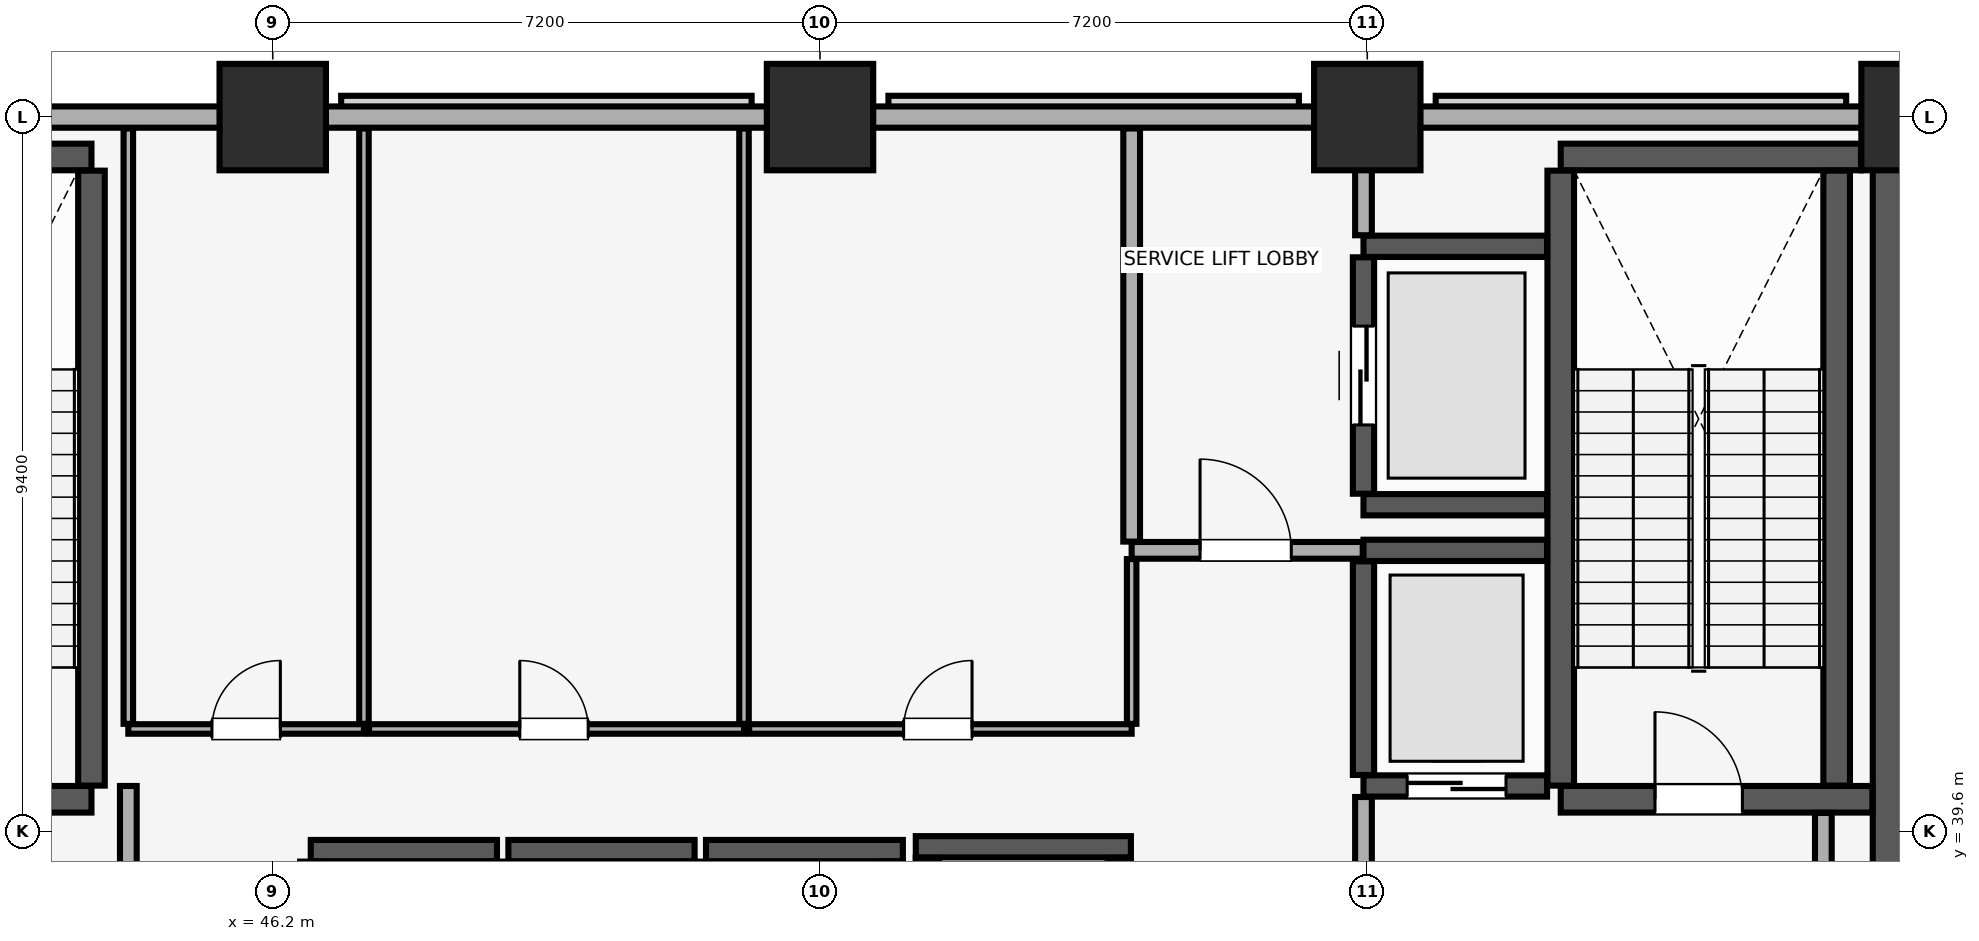
"""IFC4 building model, lengths in metres.
Left out: names, types, materials, properties, quantities, classifications, styles, units other than length and angle.
Written with IfcOpenShell. Run it as: python <this file> out.ifc"""

import sys

from ifc_helpers import new_model, si_unit, direction, frame, frame_2d, origin, origin_2d, place, context, subcontext, project, spatial, rectangle, extrude, element, fill, save


model = new_model("IFC4")
c1 = context("Model", 3, precision=1e-05, world=origin(), true_north=direction((0.0, 1.0)))
c2 = subcontext(c1, "Body", "Model", "MODEL_VIEW")
j1 = project(units=[si_unit("LENGTHUNIT", "METRE"), si_unit("PLANEANGLEUNIT", "RADIAN")], contexts=[c1])
p1 = place(None, origin())
s1 = spatial("IfcSite", under=j1, at=p1, CompositionType="ELEMENT")
p2 = place(p1, origin())
s2 = spatial("IfcBuilding", under=s1, at=p2, CompositionType="ELEMENT")
p3 = place(p2, frame((0.0, 0.0, 80.15)))
s3 = spatial("IfcBuildingStorey", under=s2, at=p3, CompositionType="ELEMENT", Elevation=80.15)
for number, where, z_axis, x_axis in (
    (1, (46.2, 49.0, 0.0), (0.0, 0.0, 1.0), (1.0, 0.0, 0.0)),
    (2, (53.4, 49.0, 0.0), (0.0, 0.0, 1.0), (1.0, 0.0, 0.0)),
    (3, (60.6, 49.0, 0.0), (0.0, 0.0, 1.0), (1.0, 0.0, 0.0)),
    (4, (67.8, 49.0, 0.0), (0.0, 0.0, 1.0), (1.0, 0.0, 0.0)),
):
    element("IfcColumn", number, at=place(p3, frame(where, z_axis=z_axis, x_axis=x_axis)), inside=s3, PredefinedType="COLUMN", context=c2, shape_type="SweptSolid", body=[
        extrude(rectangle(XDim=1.4, YDim=1.4, at=origin_2d()), origin(), (0.0, 0.0, 1.0), 5.16),
    ])
p4 = place(p3, frame((79.8, 49.0, 0.0), z_axis=(0.0, 0.0, 1.0), x_axis=(-1.0, 0.0, 0.0)))
e5 = element("IfcWall", 5, at=p4, inside=s3, PredefinedType="SOLIDWALL", context=c2, shape_type="SweptSolid", body=[
    extrude(rectangle(XDim=75.6, YDim=0.28, at=frame_2d((37.8, 0.0))), origin(), (0.0, 0.0, 1.0), 4.21),
])
p5 = place(p3, frame((67.8, 29.4, 0.0), z_axis=(0.0, 0.0, 1.0), x_axis=(0.0, 1.0, 0.0)))
e6 = element("IfcWall", 6, at=p5, inside=s3, PredefinedType="SHEAR", context=c2, shape_type="SweptSolid", body=[
    extrude(rectangle(XDim=19.2, YDim=1.1, at=frame_2d((9.6, 0.0))), origin(), (0.0, 0.0, 1.0), 5.16),
])
p6 = place(p3, frame((40.185, 40.025, 0.0), z_axis=(0.0, 0.0, 1.0), x_axis=(1.0, 0.0, 0.0)))
e7 = element("IfcWall", 7, at=p6, inside=s3, PredefinedType="SHEAR", context=c2, shape_type="SweptSolid", body=[
    extrude(rectangle(XDim=3.63, YDim=0.35, at=frame_2d((1.815, 0.0))), origin(), (0.0, 0.0, 1.0), 5.16),
])
p7 = place(p6, frame((1.24, 0.0, 0.0)))
e8 = element("IfcOpeningElement", 8, at=p7, cuts=e7, PredefinedType="OPENING", context=c2, shape_type="SweptSolid", body=[
    extrude(rectangle(XDim=1.15, YDim=2.15, at=frame_2d((0.575, 1.075))), frame((0.0, 0.185, 0.0), z_axis=(0.0, -1.0, 0.0), x_axis=(1.0, 0.0, 0.0)), (0.0, 0.0, 1.0), 0.37),
])
p8 = place(p3, frame((40.185, 48.475, 0.0), z_axis=(0.0, 0.0, 1.0), x_axis=(1.0, 0.0, 0.0)))
e9 = element("IfcWall", 9, at=p8, inside=s3, PredefinedType="SHEAR", context=c2, shape_type="SweptSolid", body=[
    extrude(rectangle(XDim=3.63, YDim=0.35, at=frame_2d((1.815, 0.0))), origin(), (0.0, 0.0, 1.0), 5.16),
])
p9 = place(p3, frame((43.815, 40.205, 0.0), z_axis=(0.0, 0.0, 1.0), x_axis=(0.0, 1.0, 0.0)))
e10 = element("IfcWall", 10, at=p9, inside=s3, PredefinedType="SHEAR", context=c2, shape_type="SweptSolid", body=[
    extrude(rectangle(XDim=8.09, YDim=0.35, at=frame_2d((4.045, 0.0))), origin(), (0.0, 0.0, 1.0), 5.16),
])
p10 = place(p3, frame((63.145, 40.025, 0.0), z_axis=(0.0, 0.0, 1.0), x_axis=(1.0, 0.0, 0.0)))
e11 = element("IfcWall", 11, at=p10, inside=s3, PredefinedType="SHEAR", context=c2, shape_type="SweptSolid", body=[
    extrude(rectangle(XDim=4.1, YDim=0.35, at=frame_2d((2.05, 0.0))), origin(), (0.0, 0.0, 1.0), 5.16),
])
p11 = place(p10, frame((1.24, 0.0, 0.0)))
e12 = element("IfcOpeningElement", 12, at=p11, cuts=e11, PredefinedType="OPENING", context=c2, shape_type="SweptSolid", body=[
    extrude(rectangle(XDim=1.15, YDim=2.15, at=frame_2d((0.575, 1.075))), frame((0.0, 0.185, 0.0), z_axis=(0.0, -1.0, 0.0), x_axis=(1.0, 0.0, 0.0)), (0.0, 0.0, 1.0), 0.37),
])
p12 = place(p3, frame((63.145, 48.475, 0.0), z_axis=(0.0, 0.0, 1.0), x_axis=(1.0, 0.0, 0.0)))
e13 = element("IfcWall", 13, at=p12, inside=s3, PredefinedType="SHEAR", context=c2, shape_type="SweptSolid", body=[
    extrude(rectangle(XDim=3.95, YDim=0.35, at=frame_2d((1.975, 0.0))), origin(), (0.0, 0.0, 1.0), 5.16),
])
for number, where, z_axis, x_axis in (
    (14, (63.145, 40.205, 0.0), (0.0, 0.0, 1.0), (0.0, 1.0, 0.0)),
    (15, (66.775, 40.205, 0.0), (0.0, 0.0, 1.0), (0.0, 1.0, 0.0)),
):
    element("IfcWall", number, at=place(p3, frame(where, z_axis=z_axis, x_axis=x_axis)), inside=s3, PredefinedType="SHEAR", context=c2, shape_type="SweptSolid", body=[
        extrude(rectangle(XDim=8.09, YDim=0.35, at=frame_2d((4.045, 0.0))), origin(), (0.0, 0.0, 1.0), 5.16),
    ])
p13 = place(p3, frame((46.7, 39.35, 0.0), z_axis=(0.0, 0.0, 1.0), x_axis=(1.0, 0.0, 0.0)))
e16 = element("IfcWall", 16, at=p13, inside=s3, PredefinedType="SHEAR", context=c2, shape_type="SweptSolid", body=[
    extrude(rectangle(XDim=2.45, YDim=0.28, at=frame_2d((1.225, 0.0))), origin(), (0.0, 0.0, 1.0), 5.16),
])
for number, where, z_axis, x_axis in (
    (17, (46.7, 37.145, 0.0), (0.0, 0.0, 1.0), (0.0, 1.0, 0.0)),
    (18, (49.15, 37.145, 0.0), (0.0, 0.0, 1.0), (0.0, 1.0, 0.0)),
):
    element("IfcWall", number, at=place(p3, frame(where, z_axis=z_axis, x_axis=x_axis)), inside=s3, PredefinedType="SHEAR", context=c2, shape_type="SweptSolid", body=[
        extrude(rectangle(XDim=2.06, YDim=0.28, at=frame_2d((1.03, 0.0))), origin(), (0.0, 0.0, 1.0), 5.16),
    ])
p14 = place(p3, frame((49.3, 39.35, 0.0), z_axis=(0.0, 0.0, 1.0), x_axis=(1.0, 0.0, 0.0)))
e19 = element("IfcWall", 19, at=p14, inside=s3, PredefinedType="SHEAR", context=c2, shape_type="SweptSolid", body=[
    extrude(rectangle(XDim=2.45, YDim=0.28, at=frame_2d((1.225, 0.0))), origin(), (0.0, 0.0, 1.0), 5.16),
])
p15 = place(p3, frame((51.75, 37.145, 0.0), z_axis=(0.0, 0.0, 1.0), x_axis=(0.0, 1.0, 0.0)))
e20 = element("IfcWall", 20, at=p15, inside=s3, PredefinedType="SHEAR", context=c2, shape_type="SweptSolid", body=[
    extrude(rectangle(XDim=2.06, YDim=0.28, at=frame_2d((1.03, 0.0))), origin(), (0.0, 0.0, 1.0), 5.16),
])
p16 = place(p3, frame((51.9, 39.35, 0.0), z_axis=(0.0, 0.0, 1.0), x_axis=(1.0, 0.0, 0.0)))
e21 = element("IfcWall", 21, at=p16, inside=s3, PredefinedType="SHEAR", context=c2, shape_type="SweptSolid", body=[
    extrude(rectangle(XDim=2.59, YDim=0.28, at=frame_2d((1.295, 0.0))), origin(), (0.0, 0.0, 1.0), 5.16),
])
p17 = place(p3, frame((54.35, 37.145, 0.0), z_axis=(0.0, 0.0, 1.0), x_axis=(0.0, 1.0, 0.0)))
e22 = element("IfcWall", 22, at=p17, inside=s3, PredefinedType="SHEAR", context=c2, shape_type="SweptSolid", body=[
    extrude(rectangle(XDim=2.06, YDim=0.28, at=frame_2d((1.03, 0.0))), origin(), (0.0, 0.0, 1.0), 5.16),
])
p18 = place(p3, frame((54.66, 39.4, 0.0), z_axis=(0.0, 0.0, 1.0), x_axis=(1.0, 0.0, 0.0)))
e23 = element("IfcWall", 23, at=p18, inside=s3, PredefinedType="SHEAR", context=c2, shape_type="SweptSolid", body=[
    extrude(rectangle(XDim=2.83, YDim=0.28, at=frame_2d((1.415, 0.0))), origin(), (0.0, 0.0, 1.0), 5.16),
])
for number, where, z_axis, x_axis in (
    (24, (54.8, 37.145, 0.0), (0.0, 0.0, 1.0), (0.0, 1.0, 0.0)),
    (25, (57.35, 37.145, 0.0), (0.0, 0.0, 1.0), (0.0, 1.0, 0.0)),
):
    element("IfcWall", number, at=place(p3, frame(where, z_axis=z_axis, x_axis=x_axis)), inside=s3, PredefinedType="SHEAR", context=c2, shape_type="SweptSolid", body=[
        extrude(rectangle(XDim=2.11, YDim=0.28, at=frame_2d((1.055, 0.0))), origin(), (0.0, 0.0, 1.0), 5.16),
    ])
p19 = place(p3, frame((60.55, 40.2, 0.0), z_axis=(0.0, 0.0, 1.0), x_axis=(1.0, 0.0, 0.0)))
e26 = element("IfcWall", 26, at=p19, inside=s3, PredefinedType="SHEAR", context=c2, shape_type="SweptSolid", body=[
    extrude(rectangle(XDim=2.415, YDim=0.28, at=frame_2d((1.208, 0.0))), origin(), (0.0, 0.0, 1.0), 5.16),
])
p20 = place(p19, frame((0.575, 0.0, 0.0)))
e27 = element("IfcOpeningElement", 27, at=p20, cuts=e26, PredefinedType="OPENING", context=c2, shape_type="SweptSolid", body=[
    extrude(rectangle(XDim=1.3, YDim=2.3, at=frame_2d((0.65, 1.15))), frame((0.0, 0.15, 0.0), z_axis=(0.0, -1.0, 0.0), x_axis=(1.0, 0.0, 0.0)), (0.0, 0.0, 1.0), 0.3),
])
p21 = place(p3, frame((60.55, 43.3, 0.0), z_axis=(0.0, 0.0, 1.0), x_axis=(1.0, 0.0, 0.0)))
e28 = element("IfcWall", 28, at=p21, inside=s3, PredefinedType="SHEAR", context=c2, shape_type="SweptSolid", body=[
    extrude(rectangle(XDim=2.415, YDim=0.28, at=frame_2d((1.208, 0.0))), origin(), (0.0, 0.0, 1.0), 5.16),
])
p22 = place(p3, frame((60.55, 40.345, 0.0), z_axis=(0.0, 0.0, 1.0), x_axis=(0.0, 1.0, 0.0)))
e29 = element("IfcWall", 29, at=p22, inside=s3, PredefinedType="SHEAR", context=c2, shape_type="SweptSolid", body=[
    extrude(rectangle(XDim=2.81, YDim=0.28, at=frame_2d((1.405, 0.0))), origin(), (0.0, 0.0, 1.0), 5.16),
])
for number, where, z_axis, x_axis in (
    (30, (60.55, 43.9, 0.0), (0.0, 0.0, 1.0), (1.0, 0.0, 0.0)),
    (31, (60.55, 47.3, 0.0), (0.0, 0.0, 1.0), (1.0, 0.0, 0.0)),
):
    element("IfcWall", number, at=place(p3, frame(where, z_axis=z_axis, x_axis=x_axis)), inside=s3, PredefinedType="SHEAR", context=c2, shape_type="SweptSolid", body=[
        extrude(rectangle(XDim=2.415, YDim=0.28, at=frame_2d((1.208, 0.0))), origin(), (0.0, 0.0, 1.0), 5.16),
    ])
p23 = place(p3, frame((60.55, 44.045, 0.0), z_axis=(0.0, 0.0, 1.0), x_axis=(0.0, 1.0, 0.0)))
e32 = element("IfcWall", 32, at=p23, inside=s3, PredefinedType="SHEAR", context=c2, shape_type="SweptSolid", body=[
    extrude(rectangle(XDim=3.11, YDim=0.28, at=frame_2d((1.555, 0.0))), origin(), (0.0, 0.0, 1.0), 5.16),
])
p24 = place(p23, frame((0.905, 0.0, 0.0)))
e33 = element("IfcOpeningElement", 33, at=p24, cuts=e32, PredefinedType="OPENING", context=c2, shape_type="SweptSolid", body=[
    extrude(rectangle(XDim=1.3, YDim=2.3, at=frame_2d((0.65, 1.15))), frame((0.0, 0.15, 0.0), z_axis=(0.0, -1.0, 0.0), x_axis=(1.0, 0.0, 0.0)), (0.0, 0.0, 1.0), 0.3),
])
p25 = place(p3, frame((60.55, 34.415, 0.0), z_axis=(0.0, 0.0, 1.0), x_axis=(0.0, 1.0, 0.0)))
e34 = element("IfcWall", 34, at=p25, inside=s3, PredefinedType="PARTITIONING", context=c2, shape_type="SweptSolid", body=[
    extrude(rectangle(XDim=5.64, YDim=0.22, at=frame_2d((2.82, 0.0))), origin(), (0.0, 0.0, 1.0), 5.16),
])
p26 = place(p3, frame((66.6, 34.415, 0.0), z_axis=(0.0, 0.0, 1.0), x_axis=(0.0, 1.0, 0.0)))
e35 = element("IfcWall", 35, at=p26, inside=s3, PredefinedType="PARTITIONING", context=c2, shape_type="SweptSolid", body=[
    extrude(rectangle(XDim=5.43, YDim=0.22, at=frame_2d((2.715, 0.0))), origin(), (0.0, 0.0, 1.0), 5.16),
])
p27 = place(p3, frame((44.3, 34.415, 0.0), z_axis=(0.0, 0.0, 1.0), x_axis=(0.0, 1.0, 0.0)))
e36 = element("IfcWall", 36, at=p27, inside=s3, PredefinedType="PARTITIONING", context=c2, shape_type="SweptSolid", body=[
    extrude(rectangle(XDim=5.785, YDim=0.22, at=frame_2d((2.893, 0.0))), origin(), (0.0, 0.0, 1.0), 5.16),
])
p28 = place(p3, frame((57.5, 43.3, 0.0), z_axis=(0.0, 0.0, 1.0), x_axis=(1.0, 0.0, 0.0)))
e37 = element("IfcWall", 37, at=p28, inside=s3, PredefinedType="PARTITIONING", context=c2, shape_type="SweptSolid", body=[
    extrude(rectangle(XDim=3.04, YDim=0.22, at=frame_2d((1.52, 0.0))), origin(), (0.0, 0.0, 1.0), 5.16),
])
p29 = place(p28, frame((0.9, 0.0, 0.0)))
e38 = element("IfcOpeningElement", 38, at=p29, cuts=e37, PredefinedType="OPENING", context=c2, shape_type="SweptSolid", body=[
    extrude(rectangle(XDim=1.2, YDim=2.15, at=frame_2d((0.6, 1.075))), frame((0.0, 0.12, 0.0), z_axis=(0.0, -1.0, 0.0), x_axis=(1.0, 0.0, 0.0)), (0.0, 0.0, 1.0), 0.24),
])
p30 = place(p3, frame((57.5, 43.415, 0.0), z_axis=(0.0, 0.0, 1.0), x_axis=(0.0, 1.0, 0.0)))
e39 = element("IfcWall", 39, at=p30, inside=s3, PredefinedType="PARTITIONING", context=c2, shape_type="SweptSolid", body=[
    extrude(rectangle(XDim=5.435, YDim=0.22, at=frame_2d((2.718, 0.0))), origin(), (0.0, 0.0, 1.0), 5.16),
])
p31 = place(p3, frame((60.55, 47.445, 0.0), z_axis=(0.0, 0.0, 1.0), x_axis=(0.0, 1.0, 0.0)))
e40 = element("IfcWall", 40, at=p31, inside=s3, PredefinedType="PARTITIONING", context=c2, shape_type="SweptSolid", body=[
    extrude(rectangle(XDim=1.405, YDim=0.22, at=frame_2d((0.703, 0.0))), origin(), (0.0, 0.0, 1.0), 5.16),
])
p32 = place(p3, frame((44.3, 40.95, 0.0), z_axis=(0.0, 0.0, 1.0), x_axis=(1.0, 0.0, 0.0)))
e41 = element("IfcWall", 41, at=p32, inside=s3, PredefinedType="PARTITIONING", context=c2, shape_type="SweptSolid", body=[
    extrude(rectangle(XDim=3.1, YDim=0.125, at=frame_2d((1.55, 0.0))), origin(), (0.0, 0.0, 1.0), 5.16),
])
p33 = place(p32, frame((1.1, 0.0, 0.0)))
e42 = element("IfcOpeningElement", 42, at=p33, cuts=e41, PredefinedType="OPENING", context=c2, shape_type="SweptSolid", body=[
    extrude(rectangle(XDim=0.9, YDim=2.1, at=frame_2d((0.45, 1.05))), frame((0.0, 0.073, 0.0), z_axis=(0.0, -1.0, 0.0), x_axis=(1.0, 0.0, 0.0)), (0.0, 0.0, 1.0), 0.145),
])
for number, where, z_axis, x_axis in (
    (43, (44.3, 41.018, 0.0), (0.0, 0.0, 1.0), (0.0, 1.0, 0.0)),
    (44, (47.4, 41.018, 0.0), (0.0, 0.0, 1.0), (0.0, 1.0, 0.0)),
):
    element("IfcWall", number, at=place(p3, frame(where, z_axis=z_axis, x_axis=x_axis)), inside=s3, PredefinedType="PARTITIONING", context=c2, shape_type="SweptSolid", body=[
        extrude(rectangle(XDim=7.833, YDim=0.125, at=frame_2d((3.916, 0.0))), origin(), (0.0, 0.0, 1.0), 5.16),
    ])
p34 = place(p3, frame((47.468, 40.95, 0.0), z_axis=(0.0, 0.0, 1.0), x_axis=(1.0, 0.0, 0.0)))
e45 = element("IfcWall", 45, at=p34, inside=s3, PredefinedType="PARTITIONING", context=c2, shape_type="SweptSolid", body=[
    extrude(rectangle(XDim=4.932, YDim=0.125, at=frame_2d((2.466, 0.0))), origin(), (0.0, 0.0, 1.0), 5.16),
])
p35 = place(p34, frame((1.982, 0.0, 0.0)))
e46 = element("IfcOpeningElement", 46, at=p35, cuts=e45, PredefinedType="OPENING", context=c2, shape_type="SweptSolid", body=[
    extrude(rectangle(XDim=0.9, YDim=2.1, at=frame_2d((0.45, 1.05))), frame((0.0, 0.073, 0.0), z_axis=(0.0, -1.0, 0.0), x_axis=(1.0, 0.0, 0.0)), (0.0, 0.0, 1.0), 0.145),
])
p36 = place(p3, frame((52.4, 41.018, 0.0), z_axis=(0.0, 0.0, 1.0), x_axis=(0.0, 1.0, 0.0)))
e47 = element("IfcWall", 47, at=p36, inside=s3, PredefinedType="PARTITIONING", context=c2, shape_type="SweptSolid", body=[
    extrude(rectangle(XDim=7.833, YDim=0.125, at=frame_2d((3.916, 0.0))), origin(), (0.0, 0.0, 1.0), 5.16),
])
p37 = place(p3, frame((52.468, 40.95, 0.0), z_axis=(0.0, 0.0, 1.0), x_axis=(1.0, 0.0, 0.0)))
e48 = element("IfcWall", 48, at=p37, inside=s3, PredefinedType="PARTITIONING", context=c2, shape_type="SweptSolid", body=[
    extrude(rectangle(XDim=5.032, YDim=0.125, at=frame_2d((2.516, 0.0))), origin(), (0.0, 0.0, 1.0), 5.16),
])
p38 = place(p37, frame((2.032, 0.0, 0.0)))
e49 = element("IfcOpeningElement", 49, at=p38, cuts=e48, PredefinedType="OPENING", context=c2, shape_type="SweptSolid", body=[
    extrude(rectangle(XDim=0.9, YDim=2.1, at=frame_2d((0.45, 1.05))), frame((0.0, 0.073, 0.0), z_axis=(0.0, -1.0, 0.0), x_axis=(1.0, 0.0, 0.0)), (0.0, 0.0, 1.0), 0.145),
])
p39 = place(p3, frame((57.5, 41.018, 0.0), z_axis=(0.0, 0.0, 1.0), x_axis=(0.0, 1.0, 0.0)))
e50 = element("IfcWall", 50, at=p39, inside=s3, PredefinedType="PARTITIONING", context=c2, shape_type="SweptSolid", body=[
    extrude(rectangle(XDim=2.167, YDim=0.125, at=frame_2d((1.084, 0.0))), origin(), (0.0, 0.0, 1.0), 5.16),
])
p40 = place(p11, origin())
e51 = element("IfcDoor", 51, at=p40, inside=s3, OperationType="SINGLE_SWING_LEFT", PredefinedType="DOOR", context=c2, shape_type="SweptSolid", body=[
    extrude(rectangle(XDim=1.15, YDim=2.15, at=frame_2d((0.575, 1.075))), frame((0.0, 0.025, 0.0), z_axis=(0.0, -1.0, 0.0), x_axis=(1.0, 0.0, 0.0)), (0.0, 0.0, 1.0), 0.05),
])
fill(e12, e51)
p41 = place(p20, origin())
e52 = element("IfcDoor", 52, at=p41, inside=s3, OperationType="DOUBLE_DOOR_SLIDING", PredefinedType="DOOR", context=c2, shape_type="SweptSolid", body=[
    extrude(rectangle(XDim=1.3, YDim=2.3, at=frame_2d((0.65, 1.15))), frame((0.0, 0.025, 0.0), z_axis=(0.0, -1.0, 0.0), x_axis=(1.0, 0.0, 0.0)), (0.0, 0.0, 1.0), 0.05),
])
fill(e27, e52)
p42 = place(p24, origin())
e53 = element("IfcDoor", 53, at=p42, inside=s3, OperationType="DOUBLE_DOOR_SLIDING", PredefinedType="DOOR", context=c2, shape_type="SweptSolid", body=[
    extrude(rectangle(XDim=1.3, YDim=2.3, at=frame_2d((0.65, 1.15))), frame((0.0, 0.025, 0.0), z_axis=(0.0, -1.0, 0.0), x_axis=(1.0, 0.0, 0.0)), (0.0, 0.0, 1.0), 0.05),
])
fill(e33, e53)
p43 = place(p29, origin())
e54 = element("IfcDoor", 54, at=p43, inside=s3, OperationType="SINGLE_SWING_LEFT", PredefinedType="DOOR", context=c2, shape_type="SweptSolid", body=[
    extrude(rectangle(XDim=1.2, YDim=2.15, at=frame_2d((0.6, 1.075))), frame((0.0, 0.025, 0.0), z_axis=(0.0, -1.0, 0.0), x_axis=(1.0, 0.0, 0.0)), (0.0, 0.0, 1.0), 0.05),
])
fill(e38, e54)
p44 = place(p33, origin())
e55 = element("IfcDoor", 55, at=p44, inside=s3, OperationType="SINGLE_SWING_RIGHT", PredefinedType="DOOR", context=c2, shape_type="SweptSolid", body=[
    extrude(rectangle(XDim=0.9, YDim=2.1, at=frame_2d((0.45, 1.05))), frame((0.0, 0.025, 0.0), z_axis=(0.0, -1.0, 0.0), x_axis=(1.0, 0.0, 0.0)), (0.0, 0.0, 1.0), 0.05),
])
fill(e42, e55)
p45 = place(p35, origin())
e56 = element("IfcDoor", 56, at=p45, inside=s3, OperationType="SINGLE_SWING_LEFT", PredefinedType="DOOR", context=c2, shape_type="SweptSolid", body=[
    extrude(rectangle(XDim=0.9, YDim=2.1, at=frame_2d((0.45, 1.05))), frame((0.0, 0.025, 0.0), z_axis=(0.0, -1.0, 0.0), x_axis=(1.0, 0.0, 0.0)), (0.0, 0.0, 1.0), 0.05),
])
fill(e46, e56)
p46 = place(p38, origin())
e57 = element("IfcDoor", 57, at=p46, inside=s3, OperationType="SINGLE_SWING_RIGHT", PredefinedType="DOOR", context=c2, shape_type="SweptSolid", body=[
    extrude(rectangle(XDim=0.9, YDim=2.1, at=frame_2d((0.45, 1.05))), frame((0.0, 0.025, 0.0), z_axis=(0.0, -1.0, 0.0), x_axis=(1.0, 0.0, 0.0)), (0.0, 0.0, 1.0), 0.05),
])
fill(e49, e57)
save(model, sys.argv[1])
